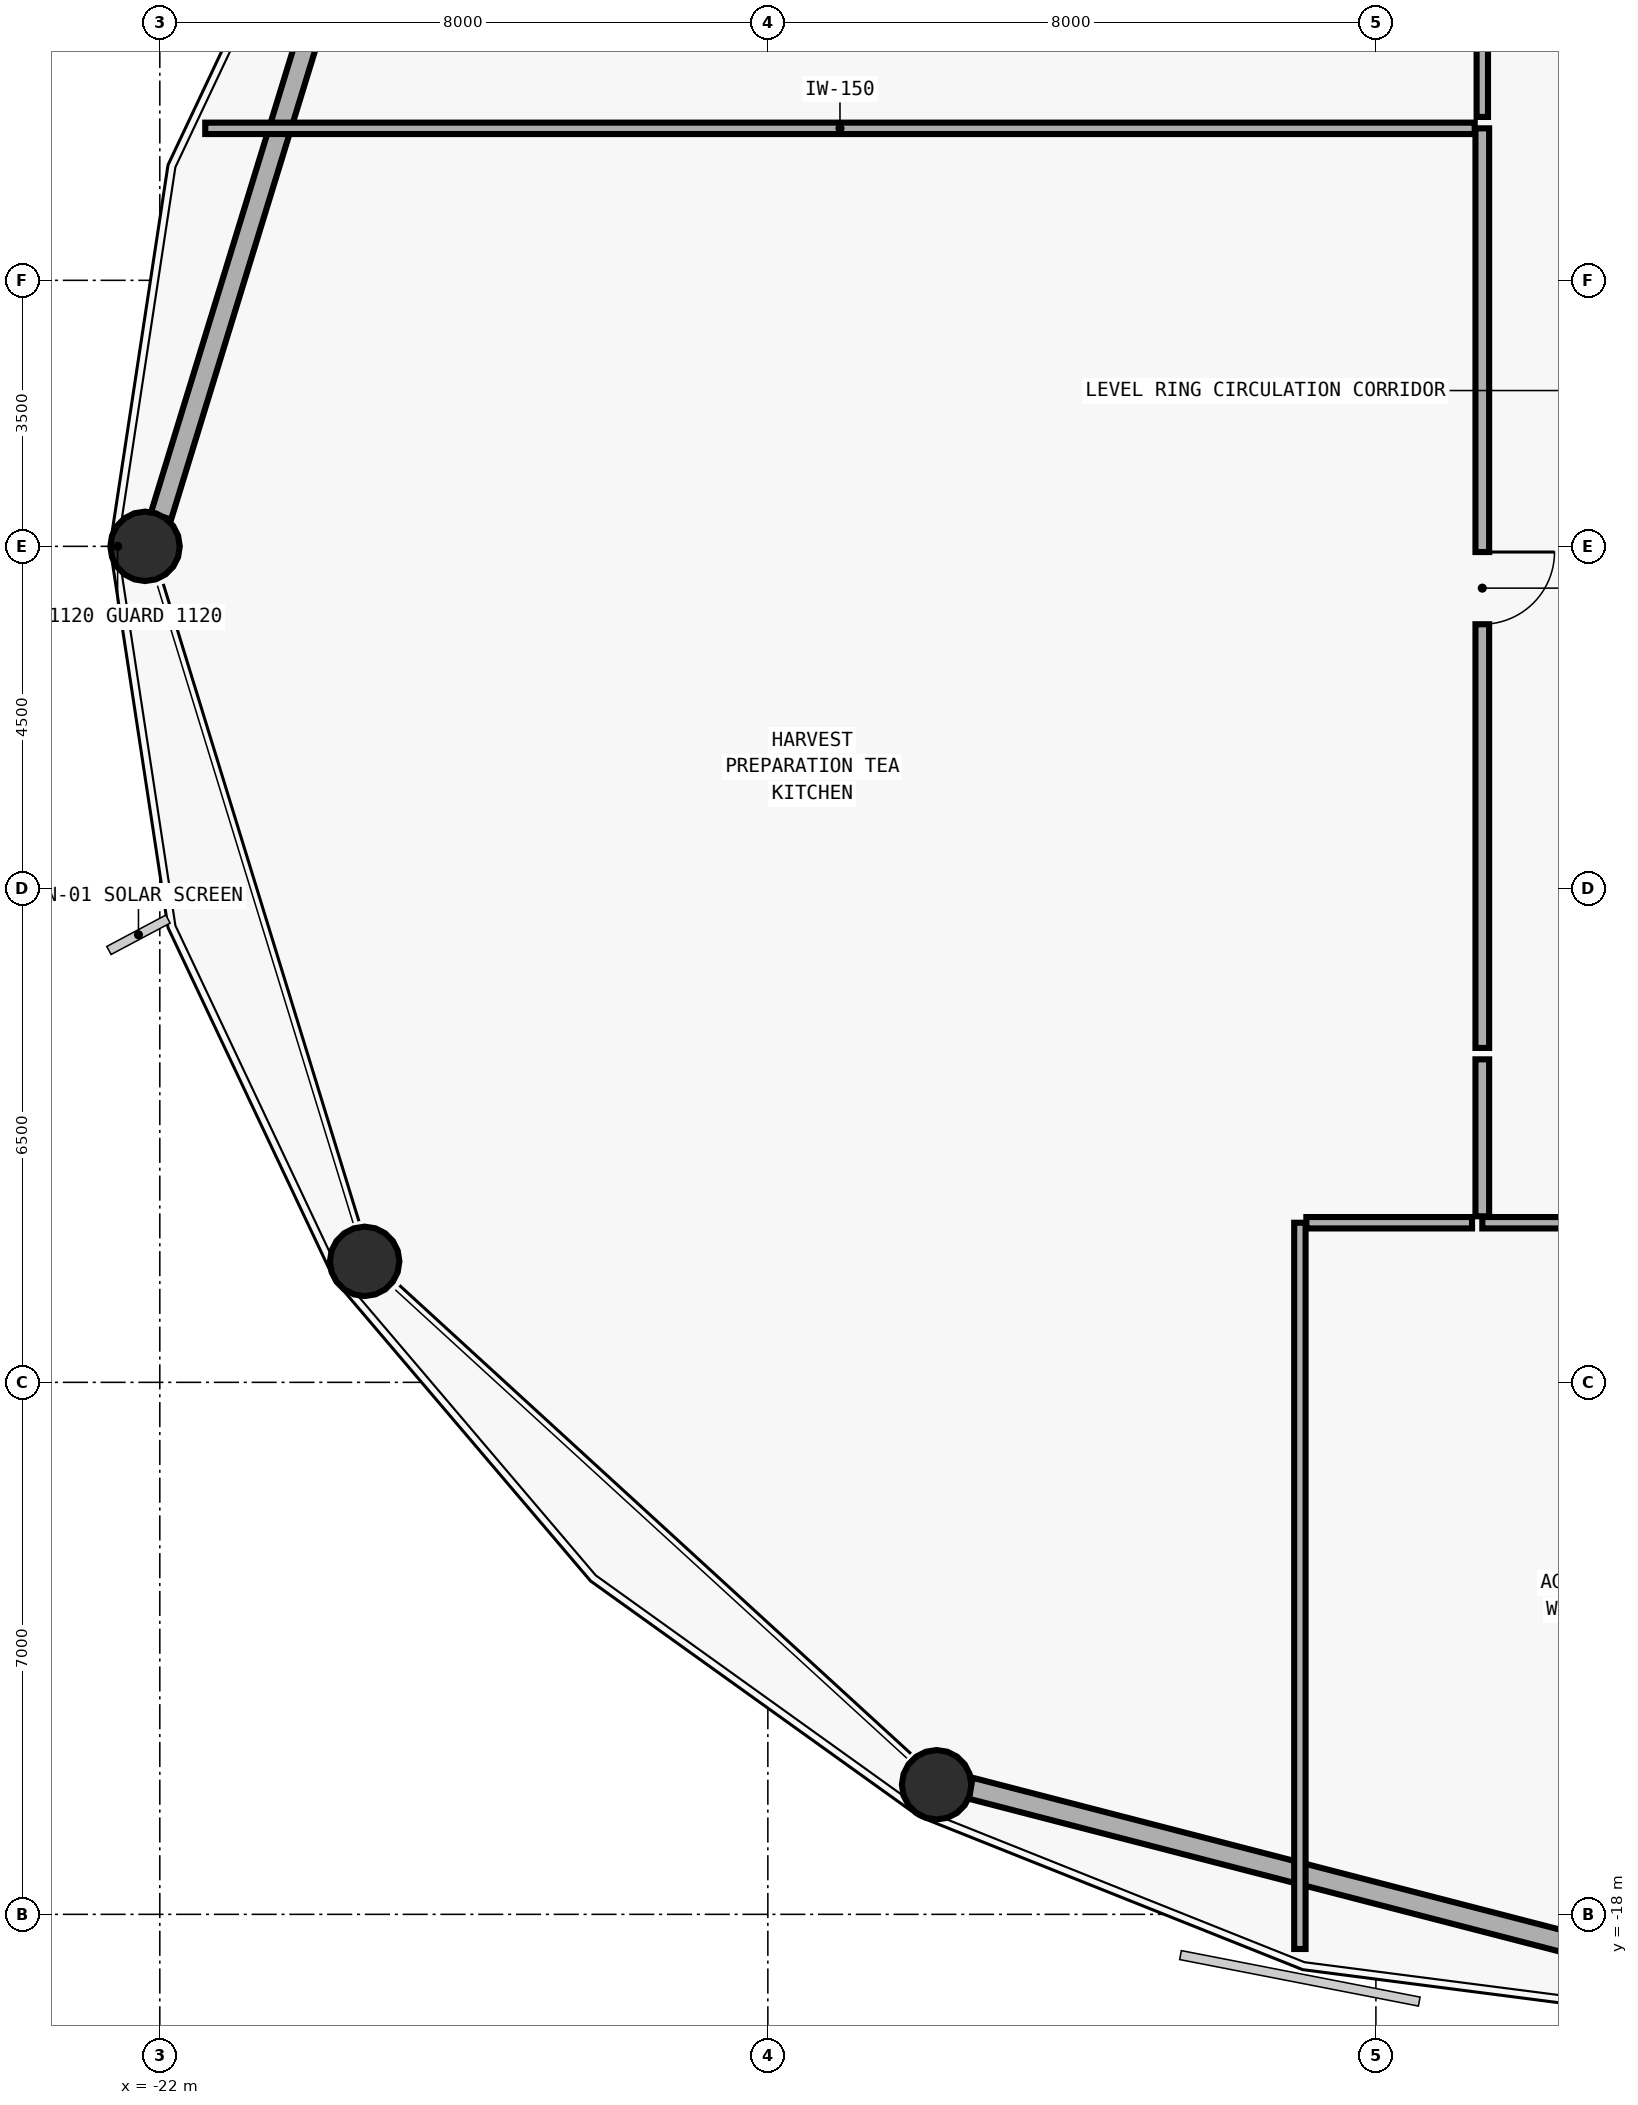
"""IFC4 building model, lengths in metres.
Left out: names, types, materials, properties, quantities, classifications, styles, units other than length and angle.
Written with IfcOpenShell. Run it as: python <this file> out.ifc"""

import sys

from ifc_helpers import new_model, si_unit, direction, frame, frame_2d, origin, origin_2d, place, context, subcontext, project, spatial, rectangle, hollow_circle, extrude, element, fill, save


model = new_model("IFC4")
c1 = context("Model", 3, precision=1e-05, world=origin(), true_north=direction((0.0, 1.0)))
c2 = subcontext(c1, "Body", "Model", "MODEL_VIEW")
j1 = project(units=[si_unit("LENGTHUNIT", "METRE"), si_unit("PLANEANGLEUNIT", "RADIAN")], contexts=[c1])
p1 = place(None, origin())
s1 = spatial("IfcSite", under=j1, at=p1, CompositionType="ELEMENT")
p2 = place(p1, origin())
s2 = spatial("IfcBuilding", under=s1, at=p2, CompositionType="ELEMENT")
p3 = place(p2, frame((0.0, 0.0, 39.3)))
s3 = spatial("IfcBuildingStorey", under=s2, at=p3, CompositionType="ELEMENT", Elevation=39.3)
p4 = place(p3, frame((-22.106, 0.0, 0.0), z_axis=(-0.045379111193, 0.0, 0.998969837516), x_axis=(0.0, -1.0, 0.0)))
e1 = element("IfcColumn", 1, at=p4, inside=s3, PredefinedType="COLUMN", context=c2, shape_type="SweptSolid", body=[
    extrude(hollow_circle(Radius=0.457, WallThickness=0.032, at=origin_2d()), origin(), (0.0, 0.0, 1.0), 3.879),
])
p5 = place(p3, frame((-19.229, -9.374, 0.0), z_axis=(-0.039278153326, -0.017498920873, 0.999075079481), x_axis=(0.406953237239, -0.913448992939, 0.0)))
e2 = element("IfcColumn", 2, at=p5, inside=s3, PredefinedType="COLUMN", context=c2, shape_type="SweptSolid", body=[
    extrude(hollow_circle(Radius=0.457, WallThickness=0.032, at=origin_2d()), origin(), (0.0, 0.0, 1.0), 3.879),
])
p6 = place(p3, frame((-11.736, -16.236, 0.0), z_axis=(-0.022665133029, -0.030409053481, 0.999280531788), x_axis=(0.801789249334, -0.597606893913, 0.0)))
e3 = element("IfcColumn", 3, at=p6, inside=s3, PredefinedType="COLUMN", context=c2, shape_type="SweptSolid", body=[
    extrude(hollow_circle(Radius=0.457, WallThickness=0.032, at=origin_2d()), origin(), (0.0, 0.0, 1.0), 3.878),
])
p7 = place(p3, frame((-21.985, 0.394, 0.0), z_axis=(0.0, 0.0, 1.0), x_axis=(0.293459272164, 0.955971576764, 0.0)))
e4 = element("IfcWall", 4, at=p7, inside=s3, PredefinedType="SOLIDWALL", context=c2, shape_type="SweptSolid", body=[
    extrude(rectangle(XDim=8.982, YDim=0.28, at=frame_2d((4.491, 0.0))), origin(), (0.0, 0.0, 1.0), 3.06),
])
p8 = place(p3, frame((-1.899, -18.78, 0.0), z_axis=(0.0, 0.0, 1.0), x_axis=(-0.968156017529, 0.250347609779, 0.0)))
e5 = element("IfcWall", 5, at=p8, inside=s3, PredefinedType="SOLIDWALL", context=c2, shape_type="SweptSolid", body=[
    extrude(rectangle(XDim=9.748, YDim=0.28, at=frame_2d((4.874, 0.0))), origin(), (0.0, 0.0, 1.0), 3.06),
])
p9 = place(p3, frame((-4.6, 5.5, 0.0), z_axis=(0.0, 0.0, 1.0), x_axis=(0.0, -1.0, 0.0)))
e6 = element("IfcWall", 6, at=p9, inside=s3, PredefinedType="PLUMBINGWALL", context=c2, shape_type="SweptSolid", body=[
    extrude(rectangle(XDim=12.1, YDim=0.18, at=frame_2d((6.05, 0.0))), origin(), (0.0, 0.0, 1.0), 3.64),
])
p10 = place(p9, frame((5.575, 0.0, 0.0)))
e7 = element("IfcOpeningElement", 7, at=p10, cuts=e6, PredefinedType="OPENING", context=c2, shape_type="SweptSolid", body=[
    extrude(rectangle(XDim=0.95, YDim=2.1, at=frame_2d((0.475, 1.05))), frame((0.0, 0.1, 0.0), z_axis=(0.0, -1.0, 0.0), x_axis=(1.0, 0.0, 0.0)), (0.0, 0.0, 1.0), 0.2),
])
p11 = place(p3, frame((-4.6, 12.5, 0.0), z_axis=(0.0, 0.0, 1.0), x_axis=(0.0, -1.0, 0.0)))
e8 = element("IfcWall", 8, at=p11, inside=s3, PredefinedType="PARTITIONING", context=c2, shape_type="SweptSolid", body=[
    extrude(rectangle(XDim=6.85, YDim=0.15, at=frame_2d((3.425, 0.0))), origin(), (0.0, 0.0, 1.0), 3.64),
])
p12 = place(p11, frame((3.025, 0.0, 0.0)))
e9 = element("IfcOpeningElement", 9, at=p12, cuts=e8, PredefinedType="OPENING", context=c2, shape_type="SweptSolid", body=[
    extrude(rectangle(XDim=0.95, YDim=2.1, at=frame_2d((0.475, 1.05))), frame((0.0, 0.085, 0.0), z_axis=(0.0, -1.0, 0.0), x_axis=(1.0, 0.0, 0.0)), (0.0, 0.0, 1.0), 0.17),
])
p13 = place(p3, frame((-4.6, -8.9, 0.0), z_axis=(0.0, 0.0, 1.0), x_axis=(1.0, 0.0, 0.0)))
e10 = element("IfcWall", 10, at=p13, inside=s3, PredefinedType="PARTITIONING", context=c2, shape_type="SweptSolid", body=[
    extrude(rectangle(XDim=2.465, YDim=0.15, at=frame_2d((1.232, 0.0))), origin(), (0.0, 0.0, 1.0), 3.64),
])
p14 = place(p3, frame((-7.0, -18.456, 0.0), z_axis=(0.0, 0.0, 1.0), x_axis=(0.0, 1.0, 0.0)))
e11 = element("IfcWall", 11, at=p14, inside=s3, PredefinedType="PARTITIONING", context=c2, shape_type="SweptSolid", body=[
    extrude(rectangle(XDim=9.556, YDim=0.15, at=frame_2d((4.778, 0.0))), origin(), (0.0, 0.0, 1.0), 3.64),
])
p15 = place(p3, frame((-6.915, -8.9, 0.0), z_axis=(0.0, 0.0, 1.0), x_axis=(1.0, 0.0, 0.0)))
e12 = element("IfcWall", 12, at=p15, inside=s3, PredefinedType="PARTITIONING", context=c2, shape_type="SweptSolid", body=[
    extrude(rectangle(XDim=2.18, YDim=0.15, at=frame_2d((1.09, 0.0))), origin(), (0.0, 0.0, 1.0), 3.64),
])
p16 = place(p3, frame((-4.6, -6.75, 0.0), z_axis=(0.0, 0.0, 1.0), x_axis=(0.0, -1.0, 0.0)))
e13 = element("IfcWall", 13, at=p16, inside=s3, PredefinedType="PLUMBINGWALL", context=c2, shape_type="SweptSolid", body=[
    extrude(rectangle(XDim=2.065, YDim=0.18, at=frame_2d((1.032, 0.0))), origin(), (0.0, 0.0, 1.0), 3.64),
])
p17 = place(p3, frame((-21.402, 5.5, 0.0), z_axis=(0.0, 0.0, 1.0), x_axis=(1.0, 0.0, 0.0)))
e14 = element("IfcWall", 14, at=p17, inside=s3, PredefinedType="PARTITIONING", context=c2, shape_type="SweptSolid", body=[
    extrude(rectangle(XDim=16.702, YDim=0.15, at=frame_2d((8.351, 0.0))), origin(), (0.0, 0.0, 1.0), 3.64),
])
p18 = place(p10, origin())
e15 = element("IfcDoor", 15, at=p18, inside=s3, OperationType="SINGLE_SWING_LEFT", PredefinedType="DOOR", context=c2, shape_type="SweptSolid", body=[
    extrude(rectangle(XDim=0.95, YDim=2.1, at=frame_2d((0.475, 1.05))), frame((0.0, 0.025, 0.0), z_axis=(0.0, -1.0, 0.0), x_axis=(1.0, 0.0, 0.0)), (0.0, 0.0, 1.0), 0.05),
])
fill(e7, e15)
save(model, sys.argv[1])
